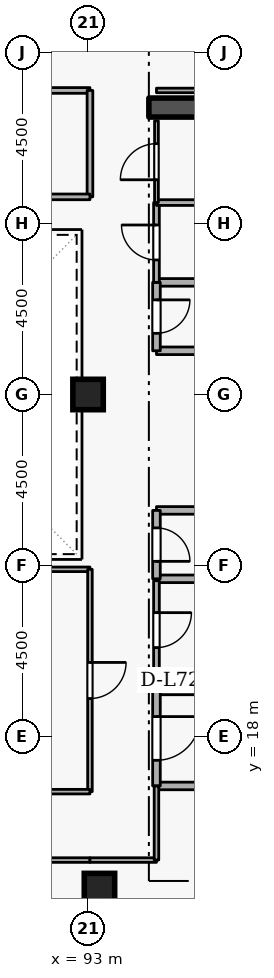
"""IFC4 building model, lengths in metres.
Left out: names, types, materials, properties, quantities, classifications, styles, units other than length and angle.
Written with IfcOpenShell. Run it as: python <this file> out.ifc"""

import sys

from ifc_helpers import new_model, si_unit, direction, frame, frame_2d, origin, origin_2d, place, context, subcontext, project, spatial, rectangle, extrude, element, fill, save


model = new_model("IFC4")
c1 = context("Model", 3, precision=1e-05, world=origin(), true_north=direction((0.0, 1.0)))
c2 = subcontext(c1, "Body", "Model", "MODEL_VIEW")
j1 = project(units=[si_unit("LENGTHUNIT", "METRE"), si_unit("PLANEANGLEUNIT", "RADIAN")], contexts=[c1])
p1 = place(None, origin())
s1 = spatial("IfcSite", under=j1, at=p1, CompositionType="ELEMENT")
p2 = place(p1, origin())
s2 = spatial("IfcBuilding", under=s1, at=p2, CompositionType="ELEMENT")
p3 = place(p2, frame((0.0, 0.0, 269.1)))
s3 = spatial("IfcBuildingStorey", under=s2, at=p3, CompositionType="ELEMENT", Elevation=269.1)
p4 = place(p3, frame((94.6, 34.55, 0.0), z_axis=(0.0, 0.0, 1.0), x_axis=(1.0, 0.0, 0.0)))
e1 = element("IfcWall", 1, at=p4, inside=s3, PredefinedType="SHEAR", context=c2, shape_type="SweptSolid", body=[
    extrude(rectangle(XDim=5.8, YDim=0.5, at=frame_2d((2.9, 0.0))), origin(), (0.0, 0.0, 1.0), 3.6),
])
for number, where, z_axis, x_axis in (
    (2, (93.3, 14.0, 0.0), (0.0, 0.0, 1.0), (1.0, 0.0, 0.0)),
    (3, (93.0, 27.0, 0.0), (0.0, 0.0, 1.0), (1.0, 0.0, 0.0)),
):
    element("IfcColumn", number, at=place(p3, frame(where, z_axis=z_axis, x_axis=x_axis)), inside=s3, PredefinedType="COLUMN", context=c2, shape_type="SweptSolid", body=[
        extrude(rectangle(XDim=0.8, YDim=0.8, at=origin_2d()), origin(), (0.0, 0.0, 1.0), 3.6),
    ])
p5 = place(p3, frame((94.8, 16.7, 0.0), z_axis=(0.0, 0.0, 1.0), x_axis=(1.0, 0.0, 0.0)))
e4 = element("IfcWall", 4, at=p5, inside=s3, PredefinedType="STANDARD", context=c2, shape_type="SweptSolid", body=[
    extrude(rectangle(XDim=5.7, YDim=0.2, at=frame_2d((2.85, 0.0))), origin(), (0.0, 0.0, 1.0), 3.34),
])
p6 = place(p3, frame((97.1, 19.2, 0.0), z_axis=(0.0, 0.0, 1.0), x_axis=(-1.0, 0.0, 0.0)))
e5 = element("IfcWall", 5, at=p6, inside=s3, PredefinedType="STANDARD", context=c2, shape_type="SweptSolid", body=[
    extrude(rectangle(XDim=2.3, YDim=0.2, at=frame_2d((1.15, 0.0))), origin(), (0.0, 0.0, 1.0), 2.545),
])
p7 = place(p3, frame((94.8, 19.2, 0.0), z_axis=(0.0, 0.0, 1.0), x_axis=(0.0, -1.0, 0.0)))
e6 = element("IfcWall", 6, at=p7, inside=s3, PredefinedType="STANDARD", context=c2, shape_type="SweptSolid", body=[
    extrude(rectangle(XDim=2.5, YDim=0.2, at=frame_2d((1.25, 0.0))), origin(), (0.0, 0.0, 1.0), 3.34),
])
p8 = place(p7, frame((0.675, 0.0, 0.0)))
e7 = element("IfcOpeningElement", 7, at=p8, cuts=e6, PredefinedType="OPENING", context=c2, shape_type="SweptSolid", body=[
    extrude(rectangle(XDim=1.15, YDim=2.1, at=frame_2d((0.575, 1.05))), frame((0.0, 0.11, 0.0), z_axis=(0.0, -1.0, 0.0), x_axis=(1.0, 0.0, 0.0)), (0.0, 0.0, 1.0), 0.22),
])
for number, where, z_axis, x_axis in (
    (8, (94.8, 28.15, 0.0), (0.0, 0.0, 1.0), (1.0, 0.0, 0.0)),
    (9, (96.85, 29.95, 0.0), (0.0, 0.0, 1.0), (-1.0, 0.0, 0.0)),
):
    element("IfcWall", number, at=place(p3, frame(where, z_axis=z_axis, x_axis=x_axis)), inside=s3, PredefinedType="STANDARD", context=c2, shape_type="SweptSolid", body=[
        extrude(rectangle(XDim=2.05, YDim=0.2, at=frame_2d((1.025, 0.0))), origin(), (0.0, 0.0, 1.0), 3.34),
    ])
p9 = place(p3, frame((94.8, 29.95, 0.0), z_axis=(0.0, 0.0, 1.0), x_axis=(0.0, -1.0, 0.0)))
e10 = element("IfcWall", 10, at=p9, inside=s3, PredefinedType="STANDARD", context=c2, shape_type="SweptSolid", body=[
    extrude(rectangle(XDim=1.8, YDim=0.2, at=frame_2d((0.9, 0.0))), origin(), (0.0, 0.0, 1.0), 3.34),
])
p10 = place(p9, frame((0.46, 0.0, 0.0)))
e11 = element("IfcOpeningElement", 11, at=p10, cuts=e10, PredefinedType="OPENING", context=c2, shape_type="SweptSolid", body=[
    extrude(rectangle(XDim=0.88, YDim=2.04, at=frame_2d((0.44, 1.02))), frame((0.0, 0.11, 0.0), z_axis=(0.0, -1.0, 0.0), x_axis=(1.0, 0.0, 0.0)), (0.0, 0.0, 1.0), 0.22),
])
for number, where, z_axis, x_axis in (
    (12, (94.8, 22.15, 0.0), (0.0, 0.0, 1.0), (1.0, 0.0, 0.0)),
    (13, (96.85, 23.95, 0.0), (0.0, 0.0, 1.0), (-1.0, 0.0, 0.0)),
):
    element("IfcWall", number, at=place(p3, frame(where, z_axis=z_axis, x_axis=x_axis)), inside=s3, PredefinedType="STANDARD", context=c2, shape_type="SweptSolid", body=[
        extrude(rectangle(XDim=2.05, YDim=0.2, at=frame_2d((1.025, 0.0))), origin(), (0.0, 0.0, 1.0), 3.34),
    ])
p11 = place(p3, frame((94.8, 23.95, 0.0), z_axis=(0.0, 0.0, 1.0), x_axis=(0.0, -1.0, 0.0)))
e14 = element("IfcWall", 14, at=p11, inside=s3, PredefinedType="STANDARD", context=c2, shape_type="SweptSolid", body=[
    extrude(rectangle(XDim=1.8, YDim=0.2, at=frame_2d((0.9, 0.0))), origin(), (0.0, 0.0, 1.0), 3.34),
])
p12 = place(p11, frame((0.46, 0.0, 0.0)))
e15 = element("IfcOpeningElement", 15, at=p12, cuts=e14, PredefinedType="OPENING", context=c2, shape_type="SweptSolid", body=[
    extrude(rectangle(XDim=0.88, YDim=2.04, at=frame_2d((0.44, 1.02))), frame((0.0, 0.11, 0.0), z_axis=(0.0, -1.0, 0.0), x_axis=(1.0, 0.0, 0.0)), (0.0, 0.0, 1.0), 0.22),
])
p13 = place(p3, frame((94.8, 19.5, 0.0), z_axis=(0.0, 0.0, 1.0), x_axis=(1.0, 0.0, 0.0)))
e16 = element("IfcWall", 16, at=p13, inside=s3, PredefinedType="PARTITIONING", context=c2, shape_type="SweptSolid", body=[
    extrude(rectangle(XDim=2.05, YDim=0.15, at=frame_2d((1.025, 0.0))), origin(), (0.0, 0.0, 1.0), 2.545),
])
p14 = place(p3, frame((94.8, 22.1, 0.0), z_axis=(0.0, 0.0, 1.0), x_axis=(0.0, -1.0, 0.0)))
e17 = element("IfcWall", 17, at=p14, inside=s3, PredefinedType="PARTITIONING", context=c2, shape_type="SweptSolid", body=[
    extrude(rectangle(XDim=2.6, YDim=0.15, at=frame_2d((1.3, 0.0))), origin(), (0.0, 0.0, 1.0), 3.34),
])
p15 = place(p14, frame((0.84, 0.0, 0.0)))
e18 = element("IfcOpeningElement", 18, at=p15, cuts=e17, PredefinedType="OPENING", context=c2, shape_type="SweptSolid", body=[
    extrude(rectangle(XDim=0.92, YDim=2.08, at=frame_2d((0.46, 1.04))), frame((0.0, 0.085, 0.0), z_axis=(0.0, -1.0, 0.0), x_axis=(1.0, 0.0, 0.0)), (0.0, 0.0, 1.0), 0.17),
])
p16 = place(p3, frame((94.8, 29.95, 0.0), z_axis=(0.0, 0.0, 1.0), x_axis=(0.0, 1.0, 0.0)))
e19 = element("IfcWall", 19, at=p16, inside=s3, PredefinedType="PARTITIONING", context=c2, shape_type="SweptSolid", body=[
    extrude(rectangle(XDim=2.1, YDim=0.15, at=frame_2d((1.05, 0.0))), origin(), (0.0, 0.0, 1.0), 3.34),
])
p17 = place(p16, frame((0.59, 0.0, 0.0)))
e20 = element("IfcOpeningElement", 20, at=p17, cuts=e19, PredefinedType="OPENING", context=c2, shape_type="SweptSolid", body=[
    extrude(rectangle(XDim=0.92, YDim=2.08, at=frame_2d((0.46, 1.04))), frame((0.0, 0.085, 0.0), z_axis=(0.0, -1.0, 0.0), x_axis=(1.0, 0.0, 0.0)), (0.0, 0.0, 1.0), 0.17),
])
p18 = place(p3, frame((94.8, 32.05, 0.0), z_axis=(0.0, 0.0, 1.0), x_axis=(1.0, 0.0, 0.0)))
e21 = element("IfcWall", 21, at=p18, inside=s3, PredefinedType="PARTITIONING", context=c2, shape_type="SweptSolid", body=[
    extrude(rectangle(XDim=2.05, YDim=0.15, at=frame_2d((1.025, 0.0))), origin(), (0.0, 0.0, 1.0), 3.34),
])
p19 = place(p3, frame((94.8, 32.05, 0.0), z_axis=(0.0, 0.0, 1.0), x_axis=(0.0, 1.0, 0.0)))
e22 = element("IfcWall", 22, at=p19, inside=s3, PredefinedType="PARTITIONING", context=c2, shape_type="SweptSolid", body=[
    extrude(rectangle(XDim=2.15, YDim=0.1, at=frame_2d((1.075, 0.0))), origin(), (0.0, 0.0, 1.0), 3.34),
])
p20 = place(p19, frame((0.6, 0.0, 0.0)))
e23 = element("IfcOpeningElement", 23, at=p20, cuts=e22, PredefinedType="OPENING", context=c2, shape_type="SweptSolid", body=[
    extrude(rectangle(XDim=0.95, YDim=2.1, at=frame_2d((0.475, 1.05))), frame((0.0, 0.06, 0.0), z_axis=(0.0, -1.0, 0.0), x_axis=(1.0, 0.0, 0.0)), (0.0, 0.0, 1.0), 0.12),
])
p21 = place(p3, frame((94.8, 35.0, 0.0), z_axis=(0.0, 0.0, 1.0), x_axis=(1.0, 0.0, 0.0)))
e24 = element("IfcWall", 24, at=p21, inside=s3, PredefinedType="PARTITIONING", context=c2, shape_type="SweptSolid", body=[
    extrude(rectangle(XDim=5.9, YDim=0.12, at=frame_2d((2.95, 0.0))), origin(), (0.0, 0.0, 1.0), 3.34),
])
p22 = place(p3, frame((87.3, 14.75, 0.0), z_axis=(0.0, 0.0, 1.0), x_axis=(1.0, 0.0, 0.0)))
e25 = element("IfcWall", 25, at=p22, inside=s3, PredefinedType="PARTITIONING", context=c2, shape_type="SweptSolid", body=[
    extrude(rectangle(XDim=5.75, YDim=0.12, at=frame_2d((2.875, 0.0))), origin(), (0.0, 0.0, 1.0), 3.34),
])
p23 = place(p22, frame((2.35, 0.0, 0.0)))
e26 = element("IfcOpeningElement", 26, at=p23, cuts=e25, PredefinedType="OPENING", context=c2, shape_type="SweptSolid", body=[
    extrude(rectangle(XDim=1.05, YDim=2.1, at=frame_2d((0.525, 1.05))), frame((0.0, 0.07, 0.0), z_axis=(0.0, -1.0, 0.0), x_axis=(1.0, 0.0, 0.0)), (0.0, 0.0, 1.0), 0.14),
])
p24 = place(p3, frame((93.05, 14.75, 0.0), z_axis=(0.0, 0.0, 1.0), x_axis=(1.0, 0.0, 0.0)))
e27 = element("IfcWall", 27, at=p24, inside=s3, PredefinedType="PARTITIONING", context=c2, shape_type="SweptSolid", body=[
    extrude(rectangle(XDim=1.75, YDim=0.12, at=frame_2d((0.875, 0.0))), origin(), (0.0, 0.0, 1.0), 3.34),
])
p25 = place(p3, frame((94.8, 14.75, 0.0), z_axis=(0.0, 0.0, 1.0), x_axis=(0.0, 1.0, 0.0)))
e28 = element("IfcWall", 28, at=p25, inside=s3, PredefinedType="PARTITIONING", context=c2, shape_type="SweptSolid", body=[
    extrude(rectangle(XDim=1.95, YDim=0.12, at=frame_2d((0.975, 0.0))), origin(), (0.0, 0.0, 1.0), 3.34),
])
p26 = place(p3, frame((87.3, 22.4, 0.0), z_axis=(0.0, 0.0, 1.0), x_axis=(1.0, 0.0, 0.0)))
e29 = element("IfcWall", 29, at=p26, inside=s3, PredefinedType="PARTITIONING", context=c2, shape_type="SweptSolid", body=[
    extrude(rectangle(XDim=5.75, YDim=0.12, at=frame_2d((2.875, 0.0))), origin(), (0.0, 0.0, 1.0), 3.34),
])
p27 = place(p3, frame((93.05, 22.4, 0.0), z_axis=(0.0, 0.0, 1.0), x_axis=(0.0, -1.0, 0.0)))
e30 = element("IfcWall", 30, at=p27, inside=s3, PredefinedType="PARTITIONING", context=c2, shape_type="SweptSolid", body=[
    extrude(rectangle(XDim=5.85, YDim=0.12, at=frame_2d((2.925, 0.0))), origin(), (0.0, 0.0, 1.0), 3.34),
])
p28 = place(p27, frame((2.45, 0.0, 0.0)))
e31 = element("IfcOpeningElement", 31, at=p28, cuts=e30, PredefinedType="OPENING", context=c2, shape_type="SweptSolid", body=[
    extrude(rectangle(XDim=0.95, YDim=2.1, at=frame_2d((0.475, 1.05))), frame((0.0, 0.07, 0.0), z_axis=(0.0, -1.0, 0.0), x_axis=(1.0, 0.0, 0.0)), (0.0, 0.0, 1.0), 0.14),
])
p29 = place(p3, frame((93.05, 16.55, 0.0), z_axis=(0.0, 0.0, 1.0), x_axis=(-1.0, 0.0, 0.0)))
e32 = element("IfcWall", 32, at=p29, inside=s3, PredefinedType="PARTITIONING", context=c2, shape_type="SweptSolid", body=[
    extrude(rectangle(XDim=5.75, YDim=0.12, at=frame_2d((2.875, 0.0))), origin(), (0.0, 0.0, 1.0), 3.34),
])
p30 = place(p3, frame((88.5, 35.0, 0.0), z_axis=(0.0, 0.0, 1.0), x_axis=(1.0, 0.0, 0.0)))
e33 = element("IfcWall", 33, at=p30, inside=s3, PredefinedType="PARTITIONING", context=c2, shape_type="SweptSolid", body=[
    extrude(rectangle(XDim=4.55, YDim=0.15, at=frame_2d((2.275, 0.0))), origin(), (0.0, 0.0, 1.0), 3.34),
])
p31 = place(p30, frame((1.625, 0.0, 0.0)))
e34 = element("IfcOpeningElement", 34, at=p31, cuts=e33, PredefinedType="OPENING", context=c2, shape_type="SweptSolid", body=[
    extrude(rectangle(XDim=1.3, YDim=2.12, at=frame_2d((0.65, 1.06))), frame((0.0, 0.085, 0.0), z_axis=(0.0, -1.0, 0.0), x_axis=(1.0, 0.0, 0.0)), (0.0, 0.0, 1.0), 0.17),
])
p32 = place(p3, frame((93.05, 35.0, 0.0), z_axis=(0.0, 0.0, 1.0), x_axis=(0.0, -1.0, 0.0)))
e35 = element("IfcWall", 35, at=p32, inside=s3, PredefinedType="PARTITIONING", context=c2, shape_type="SweptSolid", body=[
    extrude(rectangle(XDim=2.8, YDim=0.15, at=frame_2d((1.4, 0.0))), origin(), (0.0, 0.0, 1.0), 3.34),
])
p33 = place(p3, frame((93.05, 32.2, 0.0), z_axis=(0.0, 0.0, 1.0), x_axis=(-1.0, 0.0, 0.0)))
e36 = element("IfcWall", 36, at=p33, inside=s3, PredefinedType="PARTITIONING", context=c2, shape_type="SweptSolid", body=[
    extrude(rectangle(XDim=4.55, YDim=0.15, at=frame_2d((2.275, 0.0))), origin(), (0.0, 0.0, 1.0), 3.34),
])
p34 = place(p8, origin())
e37 = element("IfcDoor", 37, at=p34, inside=s3, OperationType="SINGLE_SWING_LEFT", PredefinedType="DOOR", context=c2, shape_type="SweptSolid", body=[
    extrude(rectangle(XDim=1.15, YDim=2.1, at=frame_2d((0.575, 1.05))), frame((0.0, 0.025, 0.0), z_axis=(0.0, -1.0, 0.0), x_axis=(1.0, 0.0, 0.0)), (0.0, 0.0, 1.0), 0.05),
])
fill(e7, e37)
p35 = place(p10, origin())
e38 = element("IfcDoor", 38, at=p35, inside=s3, OperationType="SINGLE_SWING_LEFT", PredefinedType="DOOR", context=c2, shape_type="SweptSolid", body=[
    extrude(rectangle(XDim=0.88, YDim=2.04, at=frame_2d((0.44, 1.02))), frame((0.0, 0.025, 0.0), z_axis=(0.0, -1.0, 0.0), x_axis=(1.0, 0.0, 0.0)), (0.0, 0.0, 1.0), 0.05),
])
fill(e11, e38)
p36 = place(p12, origin())
e39 = element("IfcDoor", 39, at=p36, inside=s3, OperationType="SINGLE_SWING_RIGHT", PredefinedType="DOOR", context=c2, shape_type="SweptSolid", body=[
    extrude(rectangle(XDim=0.88, YDim=2.04, at=frame_2d((0.44, 1.02))), frame((0.0, 0.025, 0.0), z_axis=(0.0, -1.0, 0.0), x_axis=(1.0, 0.0, 0.0)), (0.0, 0.0, 1.0), 0.05),
])
fill(e15, e39)
p37 = place(p15, origin())
e40 = element("IfcDoor", 40, at=p37, inside=s3, OperationType="SINGLE_SWING_LEFT", PredefinedType="DOOR", context=c2, shape_type="SweptSolid", body=[
    extrude(rectangle(XDim=0.92, YDim=2.08, at=frame_2d((0.46, 1.04))), frame((0.0, 0.025, 0.0), z_axis=(0.0, -1.0, 0.0), x_axis=(1.0, 0.0, 0.0)), (0.0, 0.0, 1.0), 0.05),
])
fill(e18, e40)
p38 = place(p17, origin())
e41 = element("IfcDoor", 41, at=p38, inside=s3, OperationType="SINGLE_SWING_RIGHT", PredefinedType="DOOR", context=c2, shape_type="SweptSolid", body=[
    extrude(rectangle(XDim=0.92, YDim=2.08, at=frame_2d((0.46, 1.04))), frame((0.0, 0.025, 0.0), z_axis=(0.0, -1.0, 0.0), x_axis=(1.0, 0.0, 0.0)), (0.0, 0.0, 1.0), 0.05),
])
fill(e20, e41)
p39 = place(p20, origin())
e42 = element("IfcDoor", 42, at=p39, inside=s3, OperationType="SINGLE_SWING_LEFT", PredefinedType="DOOR", context=c2, shape_type="SweptSolid", body=[
    extrude(rectangle(XDim=0.95, YDim=2.1, at=frame_2d((0.475, 1.05))), frame((0.0, 0.025, 0.0), z_axis=(0.0, -1.0, 0.0), x_axis=(1.0, 0.0, 0.0)), (0.0, 0.0, 1.0), 0.05),
])
fill(e23, e42)
p40 = place(p28, origin())
e43 = element("IfcDoor", 43, at=p40, inside=s3, OperationType="SINGLE_SWING_LEFT", PredefinedType="DOOR", context=c2, shape_type="SweptSolid", body=[
    extrude(rectangle(XDim=0.95, YDim=2.1, at=frame_2d((0.475, 1.05))), frame((0.0, 0.025, 0.0), z_axis=(0.0, -1.0, 0.0), x_axis=(1.0, 0.0, 0.0)), (0.0, 0.0, 1.0), 0.05),
])
fill(e31, e43)
save(model, sys.argv[1])
